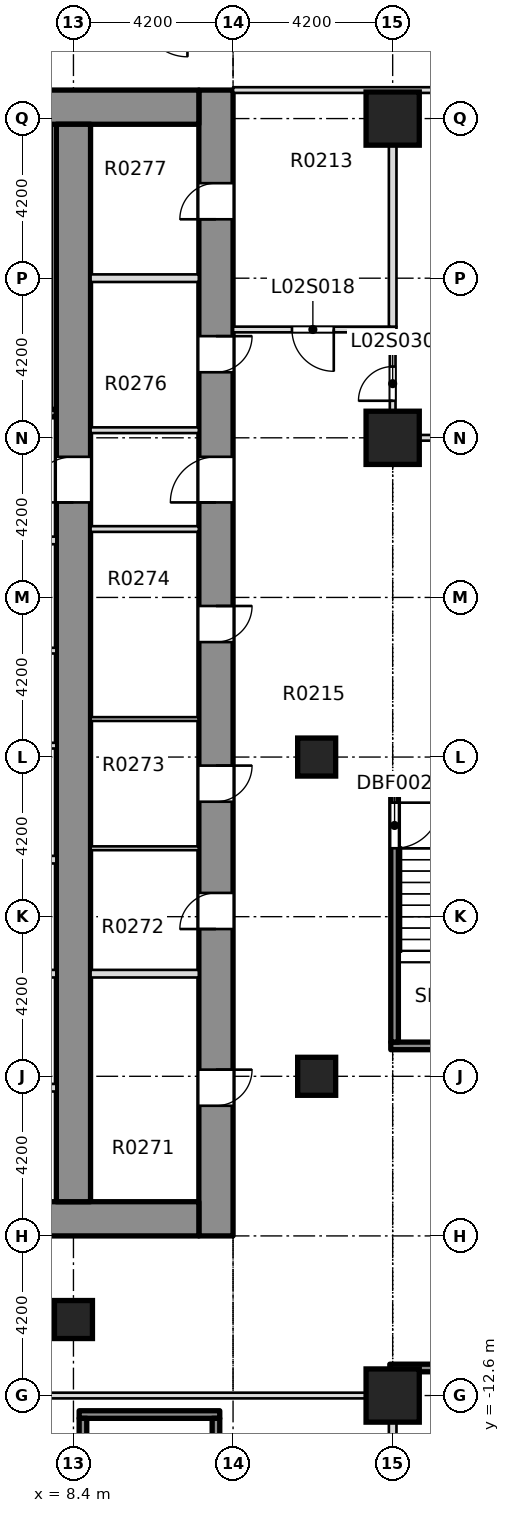
"""IFC4 building model, lengths in metres.
Left out: names, types, materials, properties, quantities, classifications, styles, units other than length and angle.
Written with IfcOpenShell. Run it as: python <this file> out.ifc"""

import sys

from ifc_helpers import new_model, si_unit, direction, frame, frame_2d, origin, origin_2d, place, context, subcontext, project, spatial, rectangle, extrude, element, fill, save


model = new_model("IFC4")
c1 = context("Model", 3, precision=1e-05, world=origin(), true_north=direction((0.0, 1.0)))
c2 = subcontext(c1, "Body", "Model", "MODEL_VIEW")
j1 = project(units=[si_unit("LENGTHUNIT", "METRE"), si_unit("PLANEANGLEUNIT", "RADIAN")], contexts=[c1])
p1 = place(None, origin())
s1 = spatial("IfcSite", under=j1, at=p1, CompositionType="ELEMENT")
p2 = place(p1, origin())
s2 = spatial("IfcBuilding", under=s1, at=p2, CompositionType="ELEMENT")
p3 = place(p2, frame((0.0, 0.0, 12.5)))
s3 = spatial("IfcBuildingStorey", under=s2, at=p3, CompositionType="ELEMENT", Elevation=12.5)
p4 = place(p3, frame((12.15, -8.4, -0.4), z_axis=(0.0, 0.0, 1.0), x_axis=(0.0, 1.0, 0.0)))
e1 = element("IfcWall", 1, at=p4, inside=s3, PredefinedType="SHEAR", context=c2, shape_type="SweptSolid", body=[
    extrude(rectangle(XDim=30.15, YDim=0.9, at=frame_2d((15.075, 0.0))), origin(), (0.0, 0.0, 1.0), 7.5),
])
p5 = place(p4, frame((3.425, 0.0, 0.4)))
e2 = element("IfcOpeningElement", 2, at=p5, cuts=e1, PredefinedType="OPENING", context=c2, shape_type="SweptSolid", body=[
    extrude(rectangle(XDim=0.95, YDim=2.1, at=frame_2d((0.475, 1.05))), frame((0.0, 0.46, 0.0), z_axis=(0.0, -1.0, 0.0), x_axis=(1.0, 0.0, 0.0)), (0.0, 0.0, 1.0), 0.92),
])
p6 = place(p4, frame((8.075, 0.0, 0.4)))
e3 = element("IfcOpeningElement", 3, at=p6, cuts=e1, PredefinedType="OPENING", context=c2, shape_type="SweptSolid", body=[
    extrude(rectangle(XDim=0.95, YDim=2.1, at=frame_2d((0.475, 1.05))), frame((0.0, 0.46, 0.0), z_axis=(0.0, -1.0, 0.0), x_axis=(1.0, 0.0, 0.0)), (0.0, 0.0, 1.0), 0.92),
])
p7 = place(p4, frame((11.425, 0.0, 0.4)))
e4 = element("IfcOpeningElement", 4, at=p7, cuts=e1, PredefinedType="OPENING", context=c2, shape_type="SweptSolid", body=[
    extrude(rectangle(XDim=0.95, YDim=2.1, at=frame_2d((0.475, 1.05))), frame((0.0, 0.46, 0.0), z_axis=(0.0, -1.0, 0.0), x_axis=(1.0, 0.0, 0.0)), (0.0, 0.0, 1.0), 0.92),
])
p8 = place(p4, frame((15.625, 0.0, 0.4)))
e5 = element("IfcOpeningElement", 5, at=p8, cuts=e1, PredefinedType="OPENING", context=c2, shape_type="SweptSolid", body=[
    extrude(rectangle(XDim=0.95, YDim=2.1, at=frame_2d((0.475, 1.05))), frame((0.0, 0.46, 0.0), z_axis=(0.0, -1.0, 0.0), x_axis=(1.0, 0.0, 0.0)), (0.0, 0.0, 1.0), 0.92),
])
p9 = place(p4, frame((22.725, 0.0, 0.4)))
e6 = element("IfcOpeningElement", 6, at=p9, cuts=e1, PredefinedType="OPENING", context=c2, shape_type="SweptSolid", body=[
    extrude(rectangle(XDim=0.95, YDim=2.1, at=frame_2d((0.475, 1.05))), frame((0.0, 0.46, 0.0), z_axis=(0.0, -1.0, 0.0), x_axis=(1.0, 0.0, 0.0)), (0.0, 0.0, 1.0), 0.92),
])
p10 = place(p4, frame((26.75, 0.0, 0.4)))
e7 = element("IfcOpeningElement", 7, at=p10, cuts=e1, PredefinedType="OPENING", context=c2, shape_type="SweptSolid", body=[
    extrude(rectangle(XDim=0.95, YDim=2.1, at=frame_2d((0.475, 1.05))), frame((0.0, 0.46, 0.0), z_axis=(0.0, -1.0, 0.0), x_axis=(1.0, 0.0, 0.0)), (0.0, 0.0, 1.0), 0.92),
])
p11 = place(p4, frame((19.3, 0.0, 0.4)))
e8 = element("IfcOpeningElement", 8, at=p11, cuts=e1, PredefinedType="OPENING", context=c2, shape_type="SweptSolid", body=[
    extrude(rectangle(XDim=1.2, YDim=2.1, at=frame_2d((0.6, 1.05))), frame((0.0, 0.46, 0.0), z_axis=(0.0, -1.0, 0.0), x_axis=(1.0, 0.0, 0.0)), (0.0, 0.0, 1.0), 0.92),
])
p12 = place(p3, frame((-11.7, -7.95, -0.4), z_axis=(0.0, 0.0, 1.0), x_axis=(1.0, 0.0, 0.0)))
e9 = element("IfcWall", 9, at=p12, inside=s3, PredefinedType="SHEAR", context=c2, shape_type="SweptSolid", body=[
    extrude(rectangle(XDim=23.4, YDim=0.9, at=frame_2d((11.7, 0.0))), origin(), (0.0, 0.0, 1.0), 7.5),
])
p13 = place(p12, frame((6.95, 0.0, 0.4)))
e10 = element("IfcOpeningElement", 10, at=p13, cuts=e9, PredefinedType="OPENING", context=c2, shape_type="SweptSolid", body=[
    extrude(rectangle(XDim=1.8, YDim=2.1, at=frame_2d((0.9, 1.05))), frame((0.0, 0.46, 0.0), z_axis=(0.0, -1.0, 0.0), x_axis=(1.0, 0.0, 0.0)), (0.0, 0.0, 1.0), 0.92),
])
p14 = place(p12, frame((14.65, 0.0, 0.4)))
e11 = element("IfcOpeningElement", 11, at=p14, cuts=e9, PredefinedType="OPENING", context=c2, shape_type="SweptSolid", body=[
    extrude(rectangle(XDim=1.8, YDim=2.1, at=frame_2d((0.9, 1.05))), frame((0.0, 0.46, 0.0), z_axis=(0.0, -1.0, 0.0), x_axis=(1.0, 0.0, 0.0)), (0.0, 0.0, 1.0), 0.92),
])
p15 = place(p3, frame((-11.7, 21.3, -0.4), z_axis=(0.0, 0.0, 1.0), x_axis=(1.0, 0.0, 0.0)))
e12 = element("IfcWall", 12, at=p15, inside=s3, PredefinedType="SOLIDWALL", context=c2, shape_type="SweptSolid", body=[
    extrude(rectangle(XDim=23.4, YDim=0.9, at=frame_2d((11.7, 0.0))), origin(), (0.0, 0.0, 1.0), 7.5),
])
p16 = place(p3, frame((8.4, -7.5, -0.4), z_axis=(0.0, 0.0, 1.0), x_axis=(0.0, 1.0, 0.0)))
e13 = element("IfcWall", 13, at=p16, inside=s3, PredefinedType="SHEAR", context=c2, shape_type="SweptSolid", body=[
    extrude(rectangle(XDim=28.35, YDim=0.9, at=frame_2d((14.175, 0.0))), origin(), (0.0, 0.0, 1.0), 7.5),
])
p17 = place(p16, frame((18.4, 0.0, 0.4)))
e14 = element("IfcOpeningElement", 14, at=p17, cuts=e13, PredefinedType="OPENING", context=c2, shape_type="SweptSolid", body=[
    extrude(rectangle(XDim=1.2, YDim=2.1, at=frame_2d((0.6, 1.05))), frame((0.0, 0.46, 0.0), z_axis=(0.0, -1.0, 0.0), x_axis=(1.0, 0.0, 0.0)), (0.0, 0.0, 1.0), 0.92),
])
for number, where, z_axis, x_axis in (
    (15, (16.8, -12.6, -0.4), (0.0, 0.0, 1.0), (1.0, 0.0, 0.0)),
    (16, (16.8, 12.6, -0.4), (0.0, 0.0, 1.0), (1.0, 0.0, 0.0)),
    (17, (16.8, 21.0, -0.4), (0.0, 0.0, 1.0), (1.0, 0.0, 0.0)),
):
    element("IfcColumn", number, at=place(p3, frame(where, z_axis=z_axis, x_axis=x_axis)), inside=s3, PredefinedType="COLUMN", context=c2, shape_type="SweptSolid", body=[
        extrude(rectangle(XDim=1.4, YDim=1.4, at=origin_2d()), origin(), (0.0, 0.0, 1.0), 7.5),
    ])
for number, where, z_axis, x_axis in (
    (18, (8.4, -10.6, -0.4), (0.0, 0.0, 1.0), (1.0, 0.0, 0.0)),
    (19, (14.8, -4.2, -0.4), (0.0, 0.0, 1.0), (1.0, 0.0, 0.0)),
    (20, (14.8, 4.2, -0.4), (0.0, 0.0, 1.0), (1.0, 0.0, 0.0)),
):
    element("IfcColumn", number, at=place(p3, frame(where, z_axis=z_axis, x_axis=x_axis)), inside=s3, PredefinedType="COLUMN", context=c2, shape_type="SweptSolid", body=[
        extrude(rectangle(XDim=1.0, YDim=1.0, at=origin_2d()), origin(), (0.0, 0.0, 1.0), 7.5),
    ])
p18 = place(p3, frame((7.275, -12.6, 0.0), z_axis=(0.0, 0.0, 1.0), x_axis=(1.0, 0.0, 0.0)))
e21 = element("IfcWall", 21, at=p18, inside=s3, PredefinedType="PARTITIONING", context=c2, shape_type="SweptSolid", body=[
    extrude(rectangle(XDim=9.625, YDim=0.15, at=frame_2d((4.812, 0.0))), origin(), (0.0, 0.0, 1.0), 7.1),
])
p19 = place(p3, frame((16.725, -11.875, 0.0), z_axis=(0.0, 0.0, 1.0), x_axis=(1.0, 0.0, 0.0)))
e22 = element("IfcWall", 22, at=p19, inside=s3, PredefinedType="SOLIDWALL", context=c2, shape_type="SweptSolid", body=[
    extrude(rectangle(XDim=8.575, YDim=0.2, at=frame_2d((4.288, 0.0))), origin(), (0.0, 0.0, 1.0), 7.1),
])
p20 = place(p3, frame((16.725, 12.6, 0.0), z_axis=(0.0, 0.0, 1.0), x_axis=(1.0, 0.0, 0.0)))
e23 = element("IfcWall", 23, at=p20, inside=s3, PredefinedType="PARTITIONING", context=c2, shape_type="SweptSolid", body=[
    extrude(rectangle(XDim=8.575, YDim=0.15, at=frame_2d((4.288, 0.0))), origin(), (0.0, 0.0, 1.0), 7.1),
])
p21 = place(p3, frame((12.601, 15.45, 0.0), z_axis=(0.0, 0.0, 1.0), x_axis=(1.0, 0.0, 0.0)))
e24 = element("IfcWall", 24, at=p21, inside=s3, PredefinedType="PARTITIONING", context=c2, shape_type="SweptSolid", body=[
    extrude(rectangle(XDim=4.299, YDim=0.15, at=frame_2d((2.149, 0.0))), origin(), (0.0, 0.0, 1.0), 7.1),
])
p22 = place(p21, frame((1.549, 0.0, 0.0)))
e25 = element("IfcOpeningElement", 25, at=p22, cuts=e24, PredefinedType="OPENING", context=c2, shape_type="SweptSolid", body=[
    extrude(rectangle(XDim=1.1, YDim=2.1, at=frame_2d((0.55, 1.05))), frame((0.0, 0.085, 0.0), z_axis=(0.0, -1.0, 0.0), x_axis=(1.0, 0.0, 0.0)), (0.0, 0.0, 1.0), 0.17),
])
p23 = place(p3, frame((12.601, 21.75, 0.0), z_axis=(0.0, 0.0, 1.0), x_axis=(1.0, 0.0, 0.0)))
e26 = element("IfcWall", 26, at=p23, inside=s3, PredefinedType="PARTITIONING", context=c2, shape_type="SweptSolid", body=[
    extrude(rectangle(XDim=21.074, YDim=0.15, at=frame_2d((10.537, 0.0))), origin(), (0.0, 0.0, 1.0), 7.1),
])
p24 = place(p23, frame((14.249, 0.0, 0.0)))
e27 = element("IfcOpeningElement", 27, at=p24, cuts=e26, PredefinedType="OPENING", context=c2, shape_type="SweptSolid", body=[
    extrude(rectangle(XDim=0.9, YDim=2.1, at=frame_2d((0.45, 1.05))), frame((0.0, 0.085, 0.0), z_axis=(0.0, -1.0, 0.0), x_axis=(1.0, 0.0, 0.0)), (0.0, 0.0, 1.0), 0.17),
])
p25 = place(p3, frame((16.8, -18.125, 0.0), z_axis=(0.0, 0.0, 1.0), x_axis=(0.0, 1.0, 0.0)))
e28 = element("IfcWall", 28, at=p25, inside=s3, PredefinedType="PARTITIONING", context=c2, shape_type="SweptSolid", body=[
    extrude(rectangle(XDim=5.45, YDim=0.2, at=frame_2d((2.725, 0.0))), origin(), (0.0, 0.0, 1.0), 7.1),
])
p26 = place(p3, frame((16.8, -12.525, 0.0), z_axis=(0.0, 0.0, 1.0), x_axis=(0.0, 1.0, 0.0)))
e29 = element("IfcWall", 29, at=p26, inside=s3, PredefinedType="PARTITIONING", context=c2, shape_type="SweptSolid", body=[
    extrude(rectangle(XDim=0.55, YDim=0.15, at=frame_2d((0.275, 0.0))), origin(), (0.0, 0.0, 1.0), 7.1),
])
p27 = place(p3, frame((16.8, 12.675, 0.0), z_axis=(0.0, 0.0, 1.0), x_axis=(0.0, 1.0, 0.0)))
e30 = element("IfcWall", 30, at=p27, inside=s3, PredefinedType="PARTITIONING", context=c2, shape_type="SweptSolid", body=[
    extrude(rectangle(XDim=2.7, YDim=0.15, at=frame_2d((1.35, 0.0))), origin(), (0.0, 0.0, 1.0), 7.1),
])
p28 = place(p27, frame((0.9, 0.0, 0.0)))
e31 = element("IfcOpeningElement", 31, at=p28, cuts=e30, PredefinedType="OPENING", context=c2, shape_type="SweptSolid", body=[
    extrude(rectangle(XDim=0.9, YDim=2.1, at=frame_2d((0.45, 1.05))), frame((0.0, 0.085, 0.0), z_axis=(0.0, -1.0, 0.0), x_axis=(1.0, 0.0, 0.0)), (0.0, 0.0, 1.0), 0.17),
])
p29 = place(p3, frame((16.8, 15.525, 0.0), z_axis=(0.0, 0.0, 1.0), x_axis=(0.0, 1.0, 0.0)))
e32 = element("IfcWall", 32, at=p29, inside=s3, PredefinedType="PARTITIONING", context=c2, shape_type="SweptSolid", body=[
    extrude(rectangle(XDim=6.15, YDim=0.2, at=frame_2d((3.075, 0.0))), origin(), (0.0, 0.0, 1.0), 7.1),
])
for number, where, z_axis, x_axis in (
    (33, (5.575, -4.5, 0.0), (0.0, 0.0, 1.0), (1.0, 0.0, 0.0)),
    (34, (5.575, -1.5, 0.0), (0.0, 0.0, 1.0), (1.0, 0.0, 0.0)),
    (35, (5.575, 1.5, 0.0), (0.0, 0.0, 1.0), (1.0, 0.0, 0.0)),
):
    element("IfcWall", number, at=place(p3, frame(where, z_axis=z_axis, x_axis=x_axis)), inside=s3, PredefinedType="PARTITIONING", context=c2, shape_type="SweptSolid", body=[
        extrude(rectangle(XDim=2.374, YDim=0.2, at=frame_2d((1.187, 0.0))), origin(), (0.0, 0.0, 1.0), 7.1),
    ])
p30 = place(p3, frame((5.425, 4.5, 0.0), z_axis=(0.0, 0.0, 1.0), x_axis=(1.0, 0.0, 0.0)))
e36 = element("IfcWall", 36, at=p30, inside=s3, PredefinedType="PARTITIONING", context=c2, shape_type="SweptSolid", body=[
    extrude(rectangle(XDim=2.524, YDim=0.15, at=frame_2d((1.262, 0.0))), origin(), (0.0, 0.0, 1.0), 7.1),
])
p31 = place(p3, frame((-7.949, 7.0, 0.0), z_axis=(0.0, 0.0, 1.0), x_axis=(1.0, 0.0, 0.0)))
e37 = element("IfcWall", 37, at=p31, inside=s3, PredefinedType="PARTITIONING", context=c2, shape_type="SweptSolid", body=[
    extrude(rectangle(XDim=15.898, YDim=0.15, at=frame_2d((7.949, 0.0))), origin(), (0.0, 0.0, 1.0), 7.1),
])
p32 = place(p31, frame((7.249, 0.0, 0.0)))
e38 = element("IfcOpeningElement", 38, at=p32, cuts=e37, PredefinedType="OPENING", context=c2, shape_type="SweptSolid", body=[
    extrude(rectangle(XDim=1.4, YDim=2.1, at=frame_2d((0.7, 1.05))), frame((0.0, 0.085, 0.0), z_axis=(0.0, -1.0, 0.0), x_axis=(1.0, 0.0, 0.0)), (0.0, 0.0, 1.0), 0.17),
])
p33 = place(p3, frame((3.6, 9.9, 0.0), z_axis=(0.0, 0.0, 1.0), x_axis=(1.0, 0.0, 0.0)))
e39 = element("IfcWall", 39, at=p33, inside=s3, PredefinedType="PARTITIONING", context=c2, shape_type="SweptSolid", body=[
    extrude(rectangle(XDim=4.349, YDim=0.2, at=frame_2d((2.174, 0.0))), origin(), (0.0, 0.0, 1.0), 7.1),
])
p34 = place(p33, frame((2.25, 0.0, 0.0)))
e40 = element("IfcOpeningElement", 40, at=p34, cuts=e39, PredefinedType="OPENING", context=c2, shape_type="SweptSolid", body=[
    extrude(rectangle(XDim=1.1, YDim=2.1, at=frame_2d((0.55, 1.05))), frame((0.0, 0.11, 0.0), z_axis=(0.0, -1.0, 0.0), x_axis=(1.0, 0.0, 0.0)), (0.0, 0.0, 1.0), 0.22),
])
p35 = place(p3, frame((3.425, 13.25, 0.0), z_axis=(0.0, 0.0, 1.0), x_axis=(1.0, 0.0, 0.0)))
e41 = element("IfcWall", 41, at=p35, inside=s3, PredefinedType="SOLIDWALL", context=c2, shape_type="SweptSolid", body=[
    extrude(rectangle(XDim=4.524, YDim=0.2, at=frame_2d((2.262, 0.0))), origin(), (0.0, 0.0, 1.0), 7.1),
])
p36 = place(p35, frame((1.825, 0.0, 0.0)))
e42 = element("IfcOpeningElement", 42, at=p36, cuts=e41, PredefinedType="OPENING", context=c2, shape_type="SweptSolid", body=[
    extrude(rectangle(XDim=1.2, YDim=2.1, at=frame_2d((0.6, 1.05))), frame((0.0, 0.11, 0.0), z_axis=(0.0, -1.0, 0.0), x_axis=(1.0, 0.0, 0.0)), (0.0, 0.0, 1.0), 0.22),
])
p37 = place(p3, frame((8.851, -1.5, 0.0), z_axis=(0.0, 0.0, 1.0), x_axis=(1.0, 0.0, 0.0)))
e43 = element("IfcWall", 43, at=p37, inside=s3, PredefinedType="PARTITIONING", context=c2, shape_type="SweptSolid", body=[
    extrude(rectangle(XDim=2.848, YDim=0.2, at=frame_2d((1.424, 0.0))), origin(), (0.0, 0.0, 1.0), 7.1),
])
for number, where, z_axis, x_axis in (
    (44, (8.851, 1.8, 0.0), (0.0, 0.0, 1.0), (1.0, 0.0, 0.0)),
    (45, (8.851, 5.2, 0.0), (0.0, 0.0, 1.0), (1.0, 0.0, 0.0)),
):
    element("IfcWall", number, at=place(p3, frame(where, z_axis=z_axis, x_axis=x_axis)), inside=s3, PredefinedType="PARTITIONING", context=c2, shape_type="SweptSolid", body=[
        extrude(rectangle(XDim=2.848, YDim=0.1, at=frame_2d((1.424, 0.0))), origin(), (0.0, 0.0, 1.0), 7.1),
    ])
for number, where, z_axis, x_axis in (
    (46, (8.851, 10.2, 0.0), (0.0, 0.0, 1.0), (1.0, 0.0, 0.0)),
    (47, (8.851, 12.8, 0.0), (0.0, 0.0, 1.0), (1.0, 0.0, 0.0)),
):
    element("IfcWall", number, at=place(p3, frame(where, z_axis=z_axis, x_axis=x_axis)), inside=s3, PredefinedType="PARTITIONING", context=c2, shape_type="SweptSolid", body=[
        extrude(rectangle(XDim=2.848, YDim=0.15, at=frame_2d((1.424, 0.0))), origin(), (0.0, 0.0, 1.0), 7.1),
    ])
p38 = place(p3, frame((8.851, 16.8, 0.0), z_axis=(0.0, 0.0, 1.0), x_axis=(1.0, 0.0, 0.0)))
e48 = element("IfcWall", 48, at=p38, inside=s3, PredefinedType="PARTITIONING", context=c2, shape_type="SweptSolid", body=[
    extrude(rectangle(XDim=2.848, YDim=0.2, at=frame_2d((1.424, 0.0))), origin(), (0.0, 0.0, 1.0), 7.1),
])
p39 = place(p3, frame((8.55, -13.1, 0.0), z_axis=(0.0, 0.0, 1.0), x_axis=(1.0, 0.0, 0.0)))
e49 = element("IfcWall", 49, at=p39, inside=s3, PredefinedType="SOLIDWALL", context=c2, shape_type="SweptSolid", body=[
    extrude(rectangle(XDim=3.7, YDim=0.2, at=frame_2d((1.85, 0.0))), origin(), (0.0, 0.0, 1.0), 7.1),
])
p40 = place(p3, frame((8.65, -20.3, 0.0), z_axis=(0.0, 0.0, 1.0), x_axis=(0.0, 1.0, 0.0)))
e50 = element("IfcWall", 50, at=p40, inside=s3, PredefinedType="SOLIDWALL", context=c2, shape_type="SweptSolid", body=[
    extrude(rectangle(XDim=7.1, YDim=0.2, at=frame_2d((3.55, 0.0))), origin(), (0.0, 0.0, 1.0), 7.1),
])
p41 = place(p3, frame((12.15, -19.8, 0.0), z_axis=(0.0, 0.0, 1.0), x_axis=(0.0, 1.0, 0.0)))
e51 = element("IfcWall", 51, at=p41, inside=s3, PredefinedType="SOLIDWALL", context=c2, shape_type="SweptSolid", body=[
    extrude(rectangle(XDim=6.6, YDim=0.2, at=frame_2d((3.3, 0.0))), origin(), (0.0, 0.0, 1.0), 7.1),
])
for number, where, z_axis, x_axis in (
    (52, (16.75, -3.4, 0.0), (0.0, 0.0, 1.0), (1.0, 0.0, 0.0)),
    (53, (16.75, 3.4, 0.0), (0.0, 0.0, 1.0), (1.0, 0.0, 0.0)),
):
    element("IfcWall", number, at=place(p3, frame(where, z_axis=z_axis, x_axis=x_axis)), inside=s3, PredefinedType="SOLIDWALL", context=c2, shape_type="SweptSolid", body=[
        extrude(rectangle(XDim=3.7, YDim=0.2, at=frame_2d((1.85, 0.0))), origin(), (0.0, 0.0, 1.0), 7.1),
    ])
p42 = place(p3, frame((16.85, -3.3, 0.0), z_axis=(0.0, 0.0, 1.0), x_axis=(0.0, 1.0, 0.0)))
e54 = element("IfcWall", 54, at=p42, inside=s3, PredefinedType="SOLIDWALL", context=c2, shape_type="SweptSolid", body=[
    extrude(rectangle(XDim=6.6, YDim=0.2, at=frame_2d((3.3, 0.0))), origin(), (0.0, 0.0, 1.0), 7.1),
])
p43 = place(p42, frame((5.1, 0.0, 0.0)))
e55 = element("IfcOpeningElement", 55, at=p43, cuts=e54, PredefinedType="OPENING", context=c2, shape_type="SweptSolid", body=[
    extrude(rectangle(XDim=1.2, YDim=2.1, at=frame_2d((0.6, 1.05))), frame((0.0, 0.11, 0.0), z_axis=(0.0, -1.0, 0.0), x_axis=(1.0, 0.0, 0.0)), (0.0, 0.0, 1.0), 0.22),
])
p44 = place(p22, origin())
e56 = element("IfcDoor", 56, at=p44, inside=s3, OperationType="SINGLE_SWING_LEFT", PredefinedType="DOOR", context=c2, shape_type="SweptSolid", body=[
    extrude(rectangle(XDim=1.1, YDim=2.1, at=frame_2d((0.55, 1.05))), frame((0.0, 0.025, 0.0), z_axis=(0.0, -1.0, 0.0), x_axis=(1.0, 0.0, 0.0)), (0.0, 0.0, 1.0), 0.05),
])
fill(e25, e56)
p45 = place(p28, origin())
e57 = element("IfcDoor", 57, at=p45, inside=s3, OperationType="SINGLE_SWING_RIGHT", PredefinedType="DOOR", context=c2, shape_type="SweptSolid", body=[
    extrude(rectangle(XDim=0.9, YDim=2.1, at=frame_2d((0.45, 1.05))), frame((0.0, 0.025, 0.0), z_axis=(0.0, -1.0, 0.0), x_axis=(1.0, 0.0, 0.0)), (0.0, 0.0, 1.0), 0.05),
])
fill(e31, e57)
p46 = place(p5, origin())
e58 = element("IfcDoor", 58, at=p46, inside=s3, OperationType="SINGLE_SWING_LEFT", PredefinedType="DOOR", context=c2, shape_type="SweptSolid", body=[
    extrude(rectangle(XDim=0.95, YDim=2.1, at=frame_2d((0.475, 1.05))), frame((0.0, 0.025, 0.0), z_axis=(0.0, -1.0, 0.0), x_axis=(1.0, 0.0, 0.0)), (0.0, 0.0, 1.0), 0.05),
])
fill(e2, e58)
p47 = place(p6, origin())
e59 = element("IfcDoor", 59, at=p47, inside=s3, OperationType="SINGLE_SWING_LEFT", PredefinedType="DOOR", context=c2, shape_type="SweptSolid", body=[
    extrude(rectangle(XDim=0.95, YDim=2.1, at=frame_2d((0.475, 1.05))), frame((0.0, 0.025, 0.0), z_axis=(0.0, -1.0, 0.0), x_axis=(1.0, 0.0, 0.0)), (0.0, 0.0, 1.0), 0.05),
])
fill(e3, e59)
p48 = place(p7, origin())
e60 = element("IfcDoor", 60, at=p48, inside=s3, OperationType="SINGLE_SWING_LEFT", PredefinedType="DOOR", context=c2, shape_type="SweptSolid", body=[
    extrude(rectangle(XDim=0.95, YDim=2.1, at=frame_2d((0.475, 1.05))), frame((0.0, 0.025, 0.0), z_axis=(0.0, -1.0, 0.0), x_axis=(1.0, 0.0, 0.0)), (0.0, 0.0, 1.0), 0.05),
])
fill(e4, e60)
p49 = place(p8, origin())
e61 = element("IfcDoor", 61, at=p49, inside=s3, OperationType="SINGLE_SWING_LEFT", PredefinedType="DOOR", context=c2, shape_type="SweptSolid", body=[
    extrude(rectangle(XDim=0.95, YDim=2.1, at=frame_2d((0.475, 1.05))), frame((0.0, 0.025, 0.0), z_axis=(0.0, -1.0, 0.0), x_axis=(1.0, 0.0, 0.0)), (0.0, 0.0, 1.0), 0.05),
])
fill(e5, e61)
p50 = place(p9, origin())
e62 = element("IfcDoor", 62, at=p50, inside=s3, OperationType="SINGLE_SWING_LEFT", PredefinedType="DOOR", context=c2, shape_type="SweptSolid", body=[
    extrude(rectangle(XDim=0.95, YDim=2.1, at=frame_2d((0.475, 1.05))), frame((0.0, 0.025, 0.0), z_axis=(0.0, -1.0, 0.0), x_axis=(1.0, 0.0, 0.0)), (0.0, 0.0, 1.0), 0.05),
])
fill(e6, e62)
p51 = place(p10, origin())
e63 = element("IfcDoor", 63, at=p51, inside=s3, OperationType="SINGLE_SWING_LEFT", PredefinedType="DOOR", context=c2, shape_type="SweptSolid", body=[
    extrude(rectangle(XDim=0.95, YDim=2.1, at=frame_2d((0.475, 1.05))), frame((0.0, 0.025, 0.0), z_axis=(0.0, -1.0, 0.0), x_axis=(1.0, 0.0, 0.0)), (0.0, 0.0, 1.0), 0.05),
])
fill(e7, e63)
p52 = place(p11, origin())
e64 = element("IfcDoor", 64, at=p52, inside=s3, OperationType="SINGLE_SWING_LEFT", PredefinedType="DOOR", context=c2, shape_type="SweptSolid", body=[
    extrude(rectangle(XDim=1.2, YDim=2.1, at=frame_2d((0.6, 1.05))), frame((0.0, 0.025, 0.0), z_axis=(0.0, -1.0, 0.0), x_axis=(1.0, 0.0, 0.0)), (0.0, 0.0, 1.0), 0.05),
])
fill(e8, e64)
p53 = place(p17, origin())
e65 = element("IfcDoor", 65, at=p53, inside=s3, OperationType="SINGLE_SWING_LEFT", PredefinedType="DOOR", context=c2, shape_type="SweptSolid", body=[
    extrude(rectangle(XDim=1.2, YDim=2.1, at=frame_2d((0.6, 1.05))), frame((0.0, 0.025, 0.0), z_axis=(0.0, -1.0, 0.0), x_axis=(1.0, 0.0, 0.0)), (0.0, 0.0, 1.0), 0.05),
])
fill(e14, e65)
p54 = place(p43, origin())
e66 = element("IfcDoor", 66, at=p54, inside=s3, OperationType="SINGLE_SWING_LEFT", PredefinedType="DOOR", context=c2, shape_type="SweptSolid", body=[
    extrude(rectangle(XDim=1.2, YDim=2.1, at=frame_2d((0.6, 1.05))), frame((0.0, 0.025, 0.0), z_axis=(0.0, -1.0, 0.0), x_axis=(1.0, 0.0, 0.0)), (0.0, 0.0, 1.0), 0.05),
])
fill(e55, e66)
save(model, sys.argv[1])
